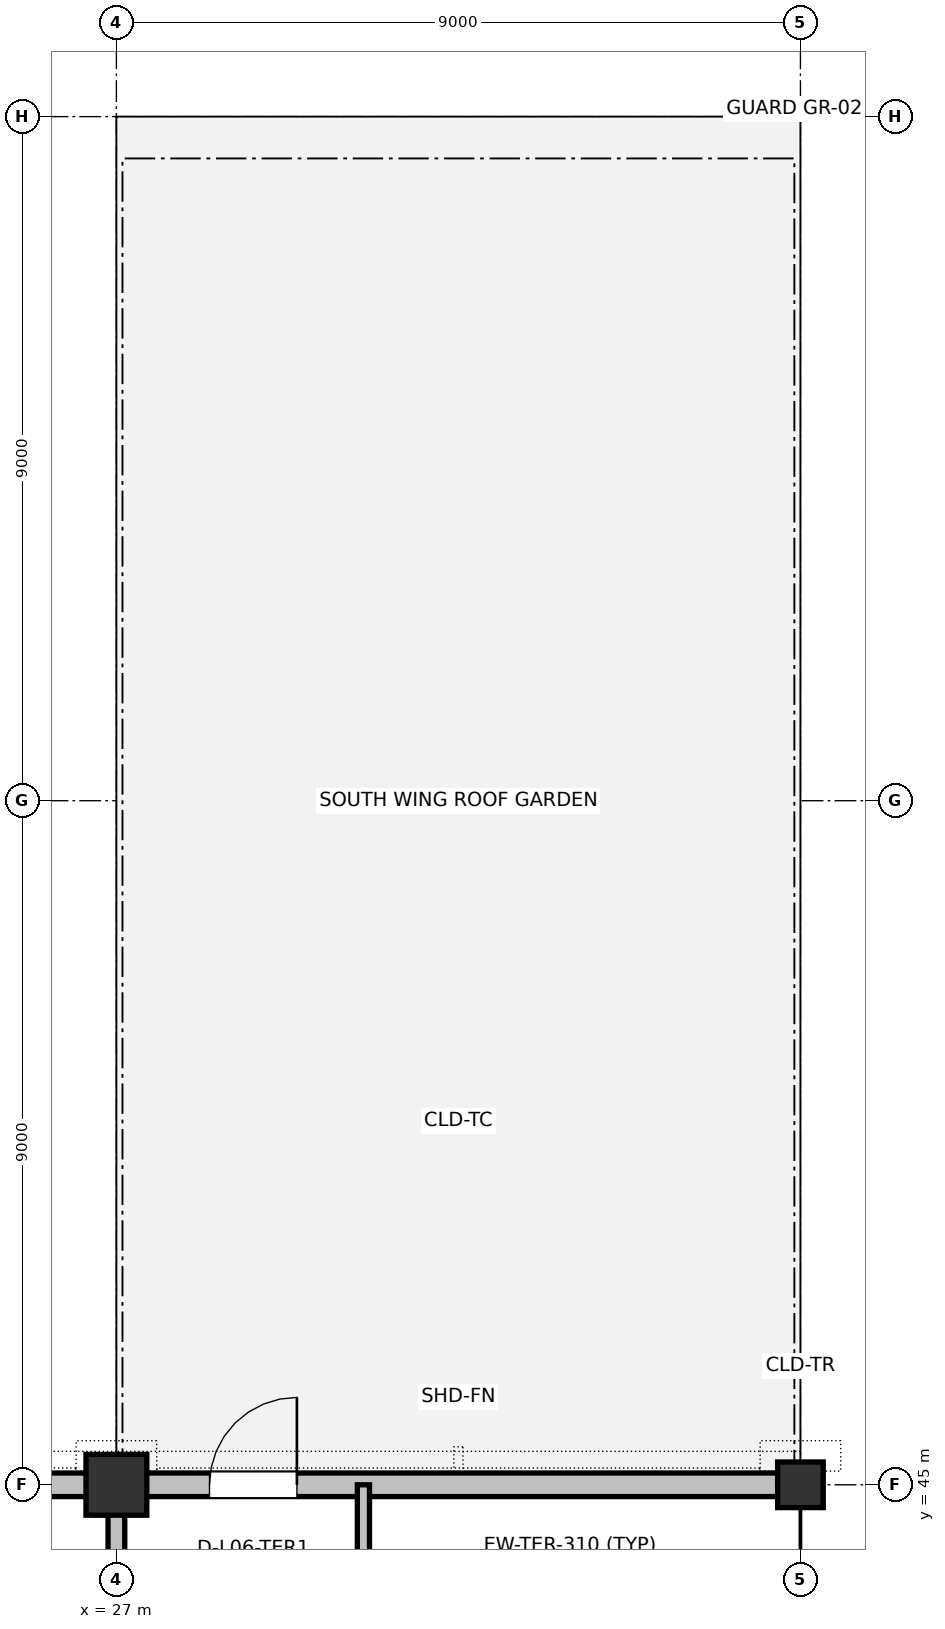
"""IFC4 building model, lengths in metres.
Left out: names, types, materials, properties, quantities, classifications, styles, units other than length and angle.
Written with IfcOpenShell. Run it as: python <this file> out.ifc"""

import sys

from ifc_helpers import new_model, si_unit, direction, frame, frame_2d, origin, origin_2d, place, context, subcontext, project, spatial, rectangle, i_section, extrude, element, fill, save


model = new_model("IFC4")
c1 = context("Model", 3, precision=1e-05, world=origin(), true_north=direction((0.0, 1.0)))
c2 = subcontext(c1, "Body", "Model", "MODEL_VIEW")
j1 = project(units=[si_unit("LENGTHUNIT", "METRE"), si_unit("PLANEANGLEUNIT", "RADIAN")], contexts=[c1])
p1 = place(None, origin())
s1 = spatial("IfcSite", under=j1, at=p1, CompositionType="ELEMENT")
p2 = place(p1, origin())
s2 = spatial("IfcBuilding", under=s1, at=p2, CompositionType="ELEMENT")
p3 = place(p2, frame((0.0, 0.0, 27.6)))
s3 = spatial("IfcBuildingStorey", under=s2, at=p3, CompositionType="ELEMENT", Elevation=27.6)
p4 = place(p3, frame((27.0, 45.0, 0.0), z_axis=(0.0, 0.0, 1.0), x_axis=(1.0, 0.0, 0.0)))
e1 = element("IfcColumn", 1, at=p4, inside=s3, PredefinedType="COLUMN", context=c2, shape_type="SweptSolid", body=[
    extrude(rectangle(XDim=0.8, YDim=0.8, at=origin_2d()), origin(), (0.0, 0.0, 1.0), 4.2),
])
p5 = place(p3, frame((36.0, 45.0, 0.0), z_axis=(0.0, 0.0, 1.0), x_axis=(1.0, 0.0, 0.0)))
e2 = element("IfcColumn", 2, at=p5, inside=s3, PredefinedType="COLUMN", context=c2, shape_type="SweptSolid", body=[
    extrude(rectangle(XDim=0.6, YDim=0.6, at=origin_2d()), origin(), (0.0, 0.0, 1.0), 4.2),
])
p6 = place(p2, frame((0.0, 0.0, 23.4)))
s4 = spatial("IfcBuildingStorey", under=s2, at=p6, CompositionType="ELEMENT", Elevation=23.4)
p7 = place(p6, frame((36.0, 63.0, 4.2), z_axis=(0.0, 0.0, 1.0), x_axis=(1.0, 0.0, 0.0)))
e3 = element("IfcColumn", 3, at=p7, inside=s4, PredefinedType="COLUMN", context=c2, shape_type="SweptSolid", body=[
    extrude(i_section(OverallWidth=0.28, OverallDepth=0.28, WebThickness=0.01, FlangeThickness=0.018, at=origin_2d()), origin(), (0.0, 0.0, 1.0), 2.54),
])
p8 = place(p3, frame((35.715, 45.0, 0.0), z_axis=(0.0, 0.0, 1.0), x_axis=(-1.0, 0.0, 0.0)))
e4 = element("IfcWall", 4, at=p8, inside=s3, PredefinedType="STANDARD", context=c2, shape_type="SweptSolid", body=[
    extrude(rectangle(XDim=8.33, YDim=0.31, at=frame_2d((4.165, 0.0))), origin(), (0.0, 0.0, 1.0), 3.735),
])
p9 = place(p8, frame((6.34, 0.0, 0.0)))
e5 = element("IfcOpeningElement", 5, at=p9, cuts=e4, PredefinedType="OPENING", context=c2, shape_type="SweptSolid", body=[
    extrude(rectangle(XDim=1.15, YDim=2.15, at=frame_2d((0.575, 1.075))), frame((0.0, 0.165, 0.0), z_axis=(0.0, -1.0, 0.0), x_axis=(1.0, 0.0, 0.0)), (0.0, 0.0, 1.0), 0.33),
])
p10 = place(p3, frame((26.615, 45.0, 0.0), z_axis=(0.0, 0.0, 1.0), x_axis=(-1.0, 0.0, 0.0)))
e6 = element("IfcWall", 6, at=p10, inside=s3, PredefinedType="STANDARD", context=c2, shape_type="SweptSolid", body=[
    extrude(rectangle(XDim=8.33, YDim=0.31, at=frame_2d((4.165, 0.0))), origin(), (0.0, 0.0, 1.0), 3.735),
])
p11 = place(p10, frame((3.49, 0.0, 0.9)))
e7 = element("IfcOpeningElement", 7, at=p11, cuts=e6, PredefinedType="OPENING", context=c2, shape_type="SweptSolid", body=[
    extrude(rectangle(XDim=1.35, YDim=2.1, at=frame_2d((0.675, 1.05))), frame((0.0, 0.165, 0.0), z_axis=(0.0, -1.0, 0.0), x_axis=(1.0, 0.0, 0.0)), (0.0, 0.0, 1.0), 0.33),
])
p12 = place(p3, frame((30.25, 21.0, 0.0), z_axis=(0.0, 0.0, 1.0), x_axis=(0.0, 1.0, 0.0)))
e8 = element("IfcWall", 8, at=p12, inside=s3, PredefinedType="PARTITIONING", context=c2, shape_type="SweptSolid", body=[
    extrude(rectangle(XDim=24.0, YDim=0.16, at=frame_2d((12.0, 0.0))), origin(), (0.0, 0.0, 1.0), 3.96),
])
p13 = place(p12, frame((4.5, 0.0, 0.0)))
e9 = element("IfcOpeningElement", 9, at=p13, cuts=e8, PredefinedType="OPENING", context=c2, shape_type="SweptSolid", body=[
    extrude(rectangle(XDim=1.4, YDim=2.2, at=frame_2d((0.7, 1.1))), frame((0.0, 0.09, 0.0), z_axis=(0.0, -1.0, 0.0), x_axis=(1.0, 0.0, 0.0)), (0.0, 0.0, 1.0), 0.18),
])
p14 = place(p3, frame((27.0, 27.0, 0.0), z_axis=(0.0, 0.0, 1.0), x_axis=(0.0, 1.0, 0.0)))
e10 = element("IfcWall", 10, at=p14, inside=s3, PredefinedType="PARTITIONING", context=c2, shape_type="SweptSolid", body=[
    extrude(rectangle(XDim=18.0, YDim=0.22, at=frame_2d((9.0, 0.0))), origin(), (0.0, 0.0, 1.0), 3.713),
])
p15 = place(p14, frame((2.5, 0.0, 0.0)))
e11 = element("IfcOpeningElement", 11, at=p15, cuts=e10, PredefinedType="OPENING", context=c2, shape_type="SweptSolid", body=[
    extrude(rectangle(XDim=1.65, YDim=2.25, at=frame_2d((0.825, 1.125))), frame((0.0, 0.12, 0.0), z_axis=(0.0, -1.0, 0.0), x_axis=(1.0, 0.0, 0.0)), (0.0, 0.0, 1.0), 0.24),
])
p16 = place(p14, frame((11.5, 0.0, 0.0)))
e12 = element("IfcOpeningElement", 12, at=p16, cuts=e10, PredefinedType="OPENING", context=c2, shape_type="SweptSolid", body=[
    extrude(rectangle(XDim=1.4, YDim=2.2, at=frame_2d((0.7, 1.1))), frame((0.0, 0.12, 0.0), z_axis=(0.0, -1.0, 0.0), x_axis=(1.0, 0.0, 0.0)), (0.0, 0.0, 1.0), 0.24),
])
p17 = place(p9, frame((1.15, 0.0, 0.0), z_axis=(0.0, 0.0, 1.0), x_axis=(-1.0, 0.0, 0.0)))
e13 = element("IfcDoor", 13, at=p17, inside=s3, OperationType="SINGLE_SWING_RIGHT", PredefinedType="DOOR", context=c2, shape_type="SweptSolid", body=[
    extrude(rectangle(XDim=1.15, YDim=2.15, at=frame_2d((0.575, 1.075))), frame((0.0, 0.025, 0.0), z_axis=(0.0, -1.0, 0.0), x_axis=(1.0, 0.0, 0.0)), (0.0, 0.0, 1.0), 0.05),
])
fill(e5, e13)
save(model, sys.argv[1])
